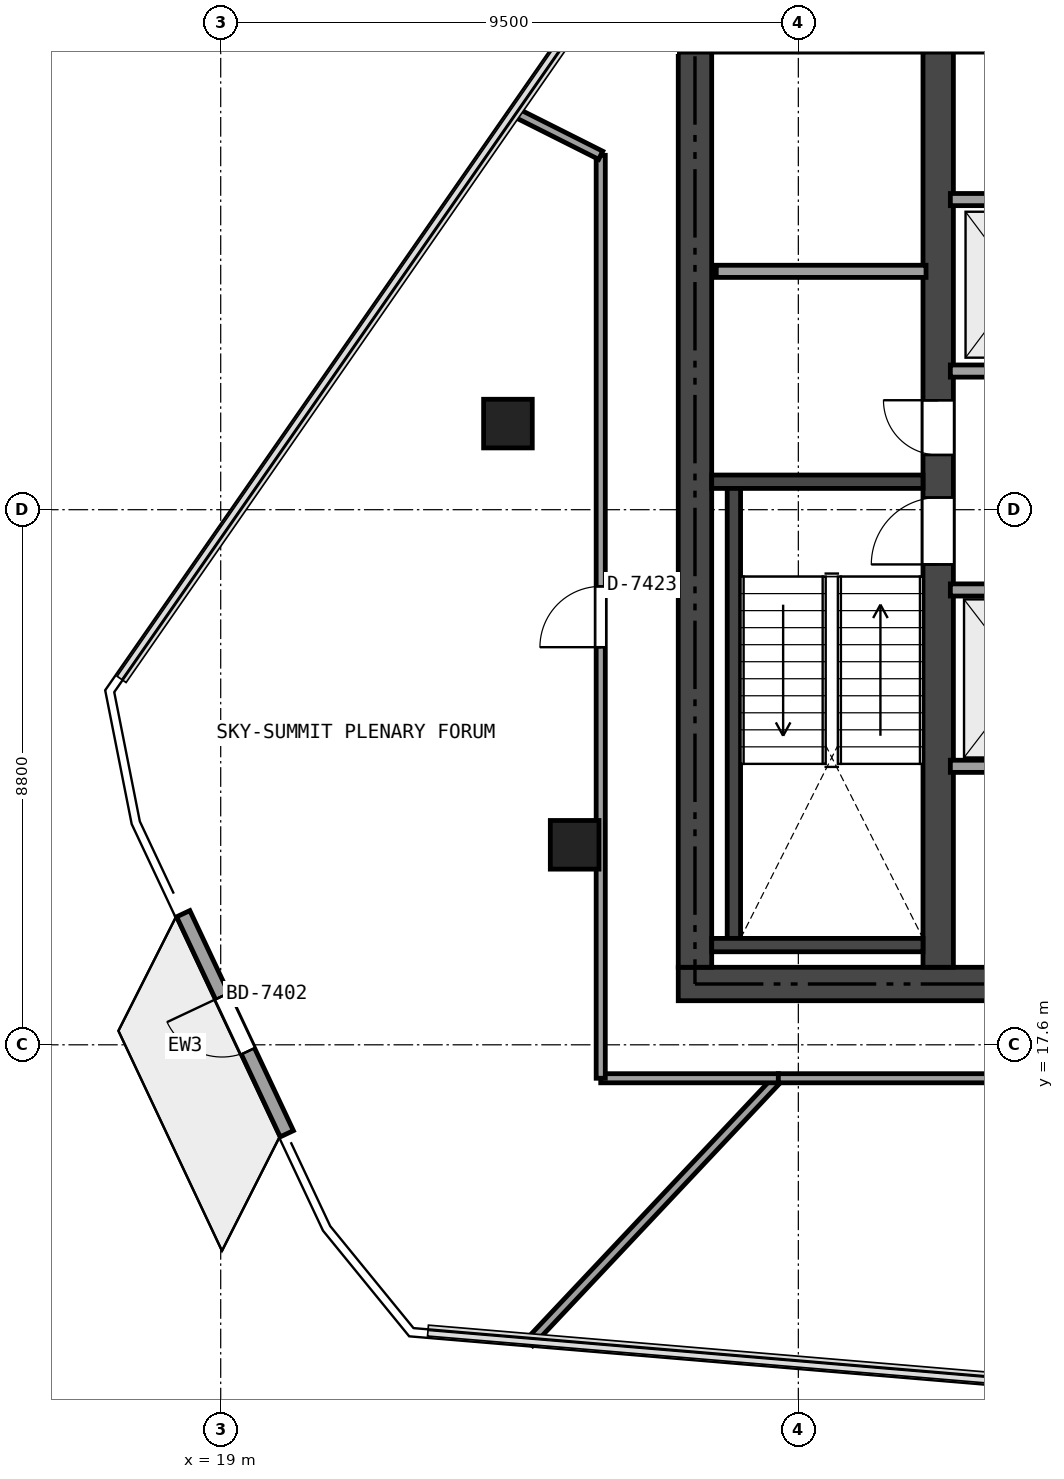
"""IFC4 building model, lengths in metres.
Left out: names, types, materials, properties, quantities, classifications, styles, units other than length and angle.
Written with IfcOpenShell. Run it as: python <this file> out.ifc"""

import sys

from ifc_helpers import new_model, si_unit, direction, frame, frame_2d, origin, origin_2d, place, context, subcontext, project, spatial, rectangle, extrude, element, fill, save


model = new_model("IFC4")
c1 = context("Model", 3, precision=1e-05, world=origin(), true_north=direction((0.0, 1.0)))
c2 = subcontext(c1, "Body", "Model", "MODEL_VIEW")
j1 = project(units=[si_unit("LENGTHUNIT", "METRE"), si_unit("PLANEANGLEUNIT", "RADIAN")], contexts=[c1])
p1 = place(None, origin())
s1 = spatial("IfcSite", under=j1, at=p1, CompositionType="ELEMENT")
p2 = place(p1, origin())
s2 = spatial("IfcBuilding", under=s1, at=p2, CompositionType="ELEMENT")
p3 = place(p2, frame((0.0, 0.0, 275.1)))
s3 = spatial("IfcBuildingStorey", under=s2, at=p3, CompositionType="ELEMENT", Elevation=275.1)
p4 = place(p3, frame((26.525, 18.6, 0.0), z_axis=(0.0, 0.0, 1.0), x_axis=(1.0, 0.0, 0.0)))
e1 = element("IfcWall", 1, at=p4, inside=s3, PredefinedType="SHEAR", context=c2, shape_type="SweptSolid", body=[
    extrude(rectangle(XDim=21.35, YDim=0.55, at=frame_2d((10.675, 0.0))), origin(), (0.0, 0.0, 1.0), 3.92),
])
p5 = place(p4, frame((12.4, 0.0, 0.0)))
e2 = element("IfcOpeningElement", 2, at=p5, cuts=e1, PredefinedType="OPENING", context=c2, shape_type="SweptSolid", body=[
    extrude(rectangle(XDim=1.15, YDim=2.15, at=frame_2d((0.575, 1.075))), frame((0.0, 0.285, 0.0), z_axis=(0.0, -1.0, 0.0), x_axis=(1.0, 0.0, 0.0)), (0.0, 0.0, 1.0), 0.57),
])
p6 = place(p4, frame((5.225, 0.0, 0.0)))
e3 = element("IfcOpeningElement", 3, at=p6, cuts=e1, PredefinedType="OPENING", context=c2, shape_type="SweptSolid", body=[
    extrude(rectangle(XDim=0.9, YDim=2.1, at=frame_2d((0.45, 1.05))), frame((0.0, 0.285, 0.0), z_axis=(0.0, -1.0, 0.0), x_axis=(1.0, 0.0, 0.0)), (0.0, 0.0, 1.0), 0.57),
])
p7 = place(p3, frame((26.8, 18.875, 0.0), z_axis=(0.0, 0.0, 1.0), x_axis=(0.0, 1.0, 0.0)))
e4 = element("IfcWall", 4, at=p7, inside=s3, PredefinedType="SHEAR", context=c2, shape_type="SweptSolid", body=[
    extrude(rectangle(XDim=15.05, YDim=0.55, at=frame_2d((7.525, 0.0))), origin(), (0.0, 0.0, 1.0), 3.92),
])
p8 = place(p3, frame((30.8, 18.875, 0.0), z_axis=(0.0, 0.0, 1.0), x_axis=(0.0, 1.0, 0.0)))
e5 = element("IfcWall", 5, at=p8, inside=s3, PredefinedType="SHEAR", context=c2, shape_type="SweptSolid", body=[
    extrude(rectangle(XDim=15.05, YDim=0.5, at=frame_2d((7.525, 0.0))), origin(), (0.0, 0.0, 1.0), 3.92),
])
p9 = place(p8, frame((6.625, 0.0, 0.0)))
e6 = element("IfcOpeningElement", 6, at=p9, cuts=e5, PredefinedType="OPENING", context=c2, shape_type="SweptSolid", body=[
    extrude(rectangle(XDim=1.1, YDim=2.15, at=frame_2d((0.55, 1.075))), frame((0.0, 0.26, 0.0), z_axis=(0.0, -1.0, 0.0), x_axis=(1.0, 0.0, 0.0)), (0.0, 0.0, 1.0), 0.52),
])
p10 = place(p8, frame((8.425, 0.0, 0.0)))
e7 = element("IfcOpeningElement", 7, at=p10, cuts=e5, PredefinedType="OPENING", context=c2, shape_type="SweptSolid", body=[
    extrude(rectangle(XDim=0.9, YDim=2.1, at=frame_2d((0.45, 1.05))), frame((0.0, 0.26, 0.0), z_axis=(0.0, -1.0, 0.0), x_axis=(1.0, 0.0, 0.0)), (0.0, 0.0, 1.0), 0.52),
])
p11 = place(p3, frame((27.075, 26.86, 0.0), z_axis=(0.0, 0.0, 1.0), x_axis=(1.0, 0.0, 0.0)))
e8 = element("IfcWall", 8, at=p11, inside=s3, PredefinedType="SHEAR", context=c2, shape_type="SweptSolid", body=[
    extrude(rectangle(XDim=3.475, YDim=0.22, at=frame_2d((1.738, 0.0))), origin(), (0.0, 0.0, 1.0), 3.92),
])
p12 = place(p3, frame((27.44, 19.35, 0.0), z_axis=(0.0, 0.0, 1.0), x_axis=(0.0, 1.0, 0.0)))
e9 = element("IfcWall", 9, at=p12, inside=s3, PredefinedType="SHEAR", context=c2, shape_type="SweptSolid", body=[
    extrude(rectangle(XDim=7.4, YDim=0.22, at=frame_2d((3.7, 0.0))), origin(), (0.0, 0.0, 1.0), 3.92),
])
p13 = place(p3, frame((27.075, 19.24, 0.0), z_axis=(0.0, 0.0, 1.0), x_axis=(1.0, 0.0, 0.0)))
e10 = element("IfcWall", 10, at=p13, inside=s3, PredefinedType="SHEAR", context=c2, shape_type="SweptSolid", body=[
    extrude(rectangle(XDim=3.475, YDim=0.22, at=frame_2d((1.738, 0.0))), origin(), (0.0, 0.0, 1.0), 3.92),
])
for number, where, z_axis, x_axis in (
    (11, (23.724, 27.816, 0.0), (0.0, 0.0, 1.0), (1.0, 0.0, 0.0)),
    (12, (24.821, 20.889, 0.0), (0.0, 0.0, 1.0), (1.0, 0.0, 0.0)),
):
    element("IfcColumn", number, at=place(p3, frame(where, z_axis=z_axis, x_axis=x_axis)), inside=s3, PredefinedType="COLUMN", context=c2, shape_type="SweptSolid", body=[
        extrude(rectangle(XDim=0.8, YDim=0.8, at=origin_2d()), origin(), (0.0, 0.0, 1.0), 3.92),
    ])
p14 = place(p3, frame((20.087, 16.137, 0.0), z_axis=(0.0, 0.0, 1.0), x_axis=(-0.425747063237, 0.904842217265, 0.0)))
e13 = element("IfcWall", 13, at=p14, inside=s3, PredefinedType="SOLIDWALL", context=c2, shape_type="SweptSolid", body=[
    extrude(rectangle(XDim=4.0, YDim=0.24, at=frame_2d((2.0, 0.0))), origin(), (0.0, 0.0, 1.0), 3.92),
])
p15 = place(p14, frame((1.5, 0.0, 0.0)))
e14 = element("IfcOpeningElement", 14, at=p15, cuts=e13, PredefinedType="OPENING", context=c2, shape_type="SweptSolid", body=[
    extrude(rectangle(XDim=1.0, YDim=2.15, at=frame_2d((0.5, 1.075))), frame((0.0, 0.13, 0.0), z_axis=(0.0, -1.0, 0.0), x_axis=(1.0, 0.0, 0.0)), (0.0, 0.0, 1.0), 0.26),
])
p16 = place(p3, frame((27.15, 30.32, 0.0), z_axis=(0.0, 0.0, 1.0), x_axis=(1.0, 0.0, 0.0)))
e15 = element("IfcWall", 15, at=p16, inside=s3, PredefinedType="SOLIDWALL", context=c2, shape_type="SweptSolid", body=[
    extrude(rectangle(XDim=3.45, YDim=0.2, at=frame_2d((1.725, 0.0))), origin(), (0.0, 0.0, 1.0), 3.92),
])
p17 = place(p3, frame((31.0, 28.68, 0.0), z_axis=(0.0, 0.0, 1.0), x_axis=(1.0, 0.0, 0.0)))
e16 = element("IfcWall", 16, at=p17, inside=s3, PredefinedType="SOLIDWALL", context=c2, shape_type="SweptSolid", body=[
    extrude(rectangle(XDim=4.42, YDim=0.2, at=frame_2d((2.21, 0.0))), origin(), (0.0, 0.0, 1.0), 3.92),
])
p18 = place(p17, frame((0.6, 0.0, 0.0)))
e17 = element("IfcOpeningElement", 17, at=p18, cuts=e16, PredefinedType="OPENING", context=c2, shape_type="SweptSolid", body=[
    extrude(rectangle(XDim=1.1, YDim=2.15, at=frame_2d((0.55, 1.075))), frame((0.0, 0.11, 0.0), z_axis=(0.0, -1.0, 0.0), x_axis=(1.0, 0.0, 0.0)), (0.0, 0.0, 1.0), 0.22),
])
p19 = place(p17, frame((2.85, 0.0, 0.0)))
e18 = element("IfcOpeningElement", 18, at=p19, cuts=e16, PredefinedType="OPENING", context=c2, shape_type="SweptSolid", body=[
    extrude(rectangle(XDim=1.1, YDim=2.15, at=frame_2d((0.55, 1.075))), frame((0.0, 0.11, 0.0), z_axis=(0.0, -1.0, 0.0), x_axis=(1.0, 0.0, 0.0)), (0.0, 0.0, 1.0), 0.22),
])
p20 = place(p3, frame((31.0, 31.5, 0.0), z_axis=(0.0, 0.0, 1.0), x_axis=(1.0, 0.0, 0.0)))
e19 = element("IfcWall", 19, at=p20, inside=s3, PredefinedType="SOLIDWALL", context=c2, shape_type="SweptSolid", body=[
    extrude(rectangle(XDim=4.42, YDim=0.2, at=frame_2d((2.21, 0.0))), origin(), (0.0, 0.0, 1.0), 3.92),
])
p21 = place(p3, frame((31.0, 25.08, 0.0), z_axis=(0.0, 0.0, 1.0), x_axis=(1.0, 0.0, 0.0)))
e20 = element("IfcWall", 20, at=p21, inside=s3, PredefinedType="SOLIDWALL", context=c2, shape_type="SweptSolid", body=[
    extrude(rectangle(XDim=4.42, YDim=0.2, at=frame_2d((2.21, 0.0))), origin(), (0.0, 0.0, 1.0), 3.92),
])
p22 = place(p21, frame((3.0, 0.0, 0.0)))
e21 = element("IfcOpeningElement", 21, at=p22, cuts=e20, PredefinedType="OPENING", context=c2, shape_type="SweptSolid", body=[
    extrude(rectangle(XDim=0.9, YDim=2.1, at=frame_2d((0.45, 1.05))), frame((0.0, 0.11, 0.0), z_axis=(0.0, -1.0, 0.0), x_axis=(1.0, 0.0, 0.0)), (0.0, 0.0, 1.0), 0.22),
])
p23 = place(p21, frame((0.62, 0.0, 0.0)))
e22 = element("IfcOpeningElement", 22, at=p23, cuts=e20, PredefinedType="OPENING", context=c2, shape_type="SweptSolid", body=[
    extrude(rectangle(XDim=1.2, YDim=2.15, at=frame_2d((0.6, 1.075))), frame((0.0, 0.11, 0.0), z_axis=(0.0, -1.0, 0.0), x_axis=(1.0, 0.0, 0.0)), (0.0, 0.0, 1.0), 0.22),
])
p24 = place(p3, frame((31.0, 22.18, 0.0), z_axis=(0.0, 0.0, 1.0), x_axis=(1.0, 0.0, 0.0)))
e23 = element("IfcWall", 23, at=p24, inside=s3, PredefinedType="SOLIDWALL", context=c2, shape_type="SweptSolid", body=[
    extrude(rectangle(XDim=2.42, YDim=0.2, at=frame_2d((1.21, 0.0))), origin(), (0.0, 0.0, 1.0), 3.92),
])
p25 = place(p3, frame((24.077, 12.702, 0.0), z_axis=(0.0, 0.0, 1.0), x_axis=(0.685508776542, 0.728064363421, 0.0)))
e24 = element("IfcWall", 24, at=p25, inside=s3, PredefinedType="PARTITIONING", context=c2, shape_type="SweptSolid", body=[
    extrude(rectangle(XDim=5.972, YDim=0.15, at=frame_2d((2.986, 0.0))), origin(), (0.0, 0.0, 1.0), 3.92),
])
p26 = place(p3, frame((28.171, 17.05, 0.0), z_axis=(0.0, 0.0, 1.0), x_axis=(-1.0, 0.0, 0.0)))
e25 = element("IfcWall", 25, at=p26, inside=s3, PredefinedType="PARTITIONING", context=c2, shape_type="SweptSolid", body=[
    extrude(rectangle(XDim=2.921, YDim=0.15, at=frame_2d((1.46, 0.0))), origin(), (0.0, 0.0, 1.0), 3.92),
])
p27 = place(p3, frame((25.25, 17.05, 0.0), z_axis=(0.0, 0.0, 1.0), x_axis=(0.0, 1.0, 0.0)))
e26 = element("IfcWall", 26, at=p27, inside=s3, PredefinedType="PARTITIONING", context=c2, shape_type="SweptSolid", body=[
    extrude(rectangle(XDim=15.178, YDim=0.15, at=frame_2d((7.589, 0.0))), origin(), (0.0, 0.0, 1.0), 3.365),
])
p28 = place(p27, frame((7.089, 0.0, 0.0)))
e27 = element("IfcOpeningElement", 27, at=p28, cuts=e26, PredefinedType="OPENING", context=c2, shape_type="SweptSolid", body=[
    extrude(rectangle(XDim=1.0, YDim=2.15, at=frame_2d((0.5, 1.075))), frame((0.0, 0.085, 0.0), z_axis=(0.0, -1.0, 0.0), x_axis=(1.0, 0.0, 0.0)), (0.0, 0.0, 1.0), 0.17),
])
p29 = place(p3, frame((25.25, 32.228, 0.0), z_axis=(0.0, 0.0, 1.0), x_axis=(-0.893575418143, 0.448913100824, 0.0)))
e28 = element("IfcWall", 28, at=p29, inside=s3, PredefinedType="PARTITIONING", context=c2, shape_type="SweptSolid", body=[
    extrude(rectangle(XDim=1.608, YDim=0.15, at=frame_2d((0.804, 0.0))), origin(), (0.0, 0.0, 1.0), 3.92),
])
p30 = place(p3, frame((42.171, 17.05, 0.0), z_axis=(0.0, 0.0, 1.0), x_axis=(-1.0, 0.0, 0.0)))
e29 = element("IfcWall", 29, at=p30, inside=s3, PredefinedType="PARTITIONING", context=c2, shape_type="SweptSolid", body=[
    extrude(rectangle(XDim=14.0, YDim=0.15, at=frame_2d((7.0, 0.0))), origin(), (0.0, 0.0, 1.0), 3.365),
])
p31 = place(p30, frame((6.5, 0.0, 0.0)))
e30 = element("IfcOpeningElement", 30, at=p31, cuts=e29, PredefinedType="OPENING", context=c2, shape_type="SweptSolid", body=[
    extrude(rectangle(XDim=1.0, YDim=2.15, at=frame_2d((0.5, 1.075))), frame((0.0, 0.085, 0.0), z_axis=(0.0, -1.0, 0.0), x_axis=(1.0, 0.0, 0.0)), (0.0, 0.0, 1.0), 0.17),
])
p32 = place(p15, origin())
e31 = element("IfcDoor", 31, at=p32, inside=s3, OperationType="SINGLE_SWING_RIGHT", PredefinedType="DOOR", context=c2, shape_type="SweptSolid", body=[
    extrude(rectangle(XDim=1.0, YDim=2.15, at=frame_2d((0.5, 1.075))), frame((0.0, 0.025, 0.0), z_axis=(0.0, -1.0, 0.0), x_axis=(1.0, 0.0, 0.0)), (0.0, 0.0, 1.0), 0.05),
])
fill(e14, e31)
p33 = place(p9, origin())
e32 = element("IfcDoor", 32, at=p33, inside=s3, OperationType="SINGLE_SWING_LEFT", PredefinedType="DOOR", context=c2, shape_type="SweptSolid", body=[
    extrude(rectangle(XDim=1.1, YDim=2.15, at=frame_2d((0.55, 1.075))), frame((0.0, 0.025, 0.0), z_axis=(0.0, -1.0, 0.0), x_axis=(1.0, 0.0, 0.0)), (0.0, 0.0, 1.0), 0.05),
])
fill(e6, e32)
p34 = place(p10, origin())
e33 = element("IfcDoor", 33, at=p34, inside=s3, OperationType="SINGLE_SWING_RIGHT", PredefinedType="DOOR", context=c2, shape_type="SweptSolid", body=[
    extrude(rectangle(XDim=0.9, YDim=2.1, at=frame_2d((0.45, 1.05))), frame((0.0, 0.025, 0.0), z_axis=(0.0, -1.0, 0.0), x_axis=(1.0, 0.0, 0.0)), (0.0, 0.0, 1.0), 0.05),
])
fill(e7, e33)
p35 = place(p28, origin())
e34 = element("IfcDoor", 34, at=p35, inside=s3, OperationType="SINGLE_SWING_LEFT", PredefinedType="DOOR", context=c2, shape_type="SweptSolid", body=[
    extrude(rectangle(XDim=1.0, YDim=2.15, at=frame_2d((0.5, 1.075))), frame((0.0, 0.025, 0.0), z_axis=(0.0, -1.0, 0.0), x_axis=(1.0, 0.0, 0.0)), (0.0, 0.0, 1.0), 0.05),
])
fill(e27, e34)
save(model, sys.argv[1])
